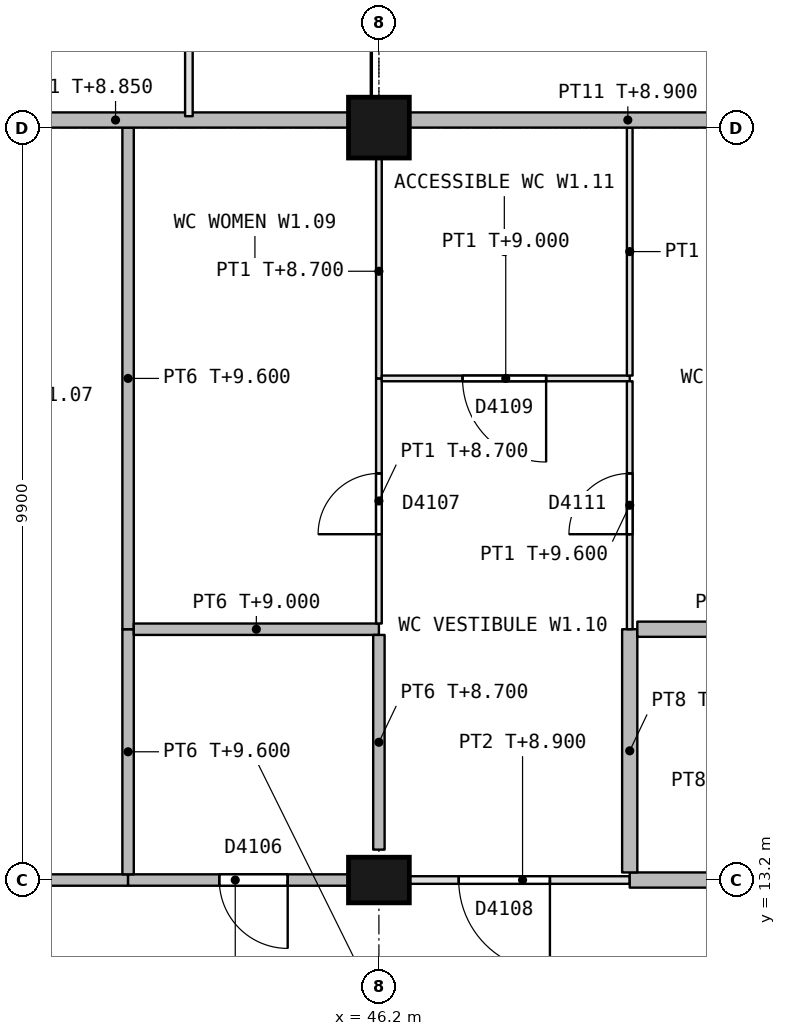
"""IFC4 building model, lengths in metres.
Left out: names, types, materials, properties, quantities, classifications, styles, units other than length and angle.
Written with IfcOpenShell. Run it as: python <this file> out.ifc"""

import sys

from ifc_helpers import new_model, si_unit, direction, frame, frame_2d, origin, origin_2d, place, context, subcontext, project, spatial, rectangle, extrude, element, fill, save


model = new_model("IFC4")
c1 = context("Model", 3, precision=1e-05, world=origin(), true_north=direction((0.0, 1.0)))
c2 = subcontext(c1, "Body", "Model", "MODEL_VIEW")
j1 = project(units=[si_unit("LENGTHUNIT", "METRE"), si_unit("PLANEANGLEUNIT", "RADIAN")], contexts=[c1])
p1 = place(None, origin())
s1 = spatial("IfcSite", under=j1, at=p1, CompositionType="ELEMENT")
p2 = place(p1, origin())
s2 = spatial("IfcBuilding", under=s1, at=p2, CompositionType="ELEMENT")
p3 = place(p2, frame((0.0, 0.0, 5.4)))
s3 = spatial("IfcBuildingStorey", under=s2, at=p3, CompositionType="ELEMENT", Elevation=5.4)
p4 = place(p3, frame((46.2, 13.2, 0.0), z_axis=(0.0, 0.0, 1.0), x_axis=(1.0, 0.0, 0.0)))
e1 = element("IfcColumn", 1, at=p4, inside=s3, PredefinedType="COLUMN", context=c2, shape_type="SweptSolid", body=[
    extrude(rectangle(XDim=0.8, YDim=0.6, at=origin_2d()), origin(), (0.0, 0.0, 1.0), 4.5),
])
p5 = place(p3, frame((46.2, 23.1, 0.0), z_axis=(0.0, 0.0, 1.0), x_axis=(1.0, 0.0, 0.0)))
e2 = element("IfcColumn", 2, at=p5, inside=s3, PredefinedType="COLUMN", context=c2, shape_type="SweptSolid", body=[
    extrude(rectangle(XDim=0.8, YDim=0.8, at=origin_2d()), origin(), (0.0, 0.0, 1.0), 4.5),
])
p6 = place(p3, frame((42.9, 13.2, 0.0), z_axis=(0.0, 0.0, 1.0), x_axis=(-1.0, 0.0, 0.0)))
e3 = element("IfcWall", 3, at=p6, inside=s3, PredefinedType="PARTITIONING", context=c2, shape_type="SweptSolid", body=[
    extrude(rectangle(XDim=3.3, YDim=0.15, at=frame_2d((1.65, 0.0))), origin(), (0.0, 0.0, 1.0), 3.5),
])
p7 = place(p6, frame((1.15, 0.0, 0.0)))
e4 = element("IfcOpeningElement", 4, at=p7, cuts=e3, PredefinedType="OPENING", context=c2, shape_type="SweptSolid", body=[
    extrude(rectangle(XDim=1.0, YDim=2.1, at=frame_2d((0.5, 1.05))), frame((0.0, 0.085, 0.0), z_axis=(0.0, -1.0, 0.0), x_axis=(1.0, 0.0, 0.0)), (0.0, 0.0, 1.0), 0.17),
])
p8 = place(p3, frame((45.8, 13.2, 0.0), z_axis=(0.0, 0.0, 1.0), x_axis=(-1.0, 0.0, 0.0)))
e5 = element("IfcWall", 5, at=p8, inside=s3, PredefinedType="PARTITIONING", context=c2, shape_type="SweptSolid", body=[
    extrude(rectangle(XDim=2.9, YDim=0.15, at=frame_2d((1.45, 0.0))), origin(), (0.0, 0.0, 1.0), 3.5),
])
p9 = place(p8, frame((0.8, 0.0, 0.0)))
e6 = element("IfcOpeningElement", 6, at=p9, cuts=e5, PredefinedType="OPENING", context=c2, shape_type="SweptSolid", body=[
    extrude(rectangle(XDim=0.9, YDim=2.1, at=frame_2d((0.45, 1.05))), frame((0.0, 0.085, 0.0), z_axis=(0.0, -1.0, 0.0), x_axis=(1.0, 0.0, 0.0)), (0.0, 0.0, 1.0), 0.17),
])
p10 = place(p3, frame((46.6, 13.2, 0.0), z_axis=(0.0, 0.0, 1.0), x_axis=(1.0, 0.0, 0.0)))
e7 = element("IfcWall", 7, at=p10, inside=s3, PredefinedType="PARTITIONING", context=c2, shape_type="SweptSolid", body=[
    extrude(rectangle(XDim=2.9, YDim=0.1, at=frame_2d((1.45, 0.0))), origin(), (0.0, 0.0, 1.0), 3.5),
])
p11 = place(p10, frame((0.65, 0.0, 0.0)))
e8 = element("IfcOpeningElement", 8, at=p11, cuts=e7, PredefinedType="OPENING", context=c2, shape_type="SweptSolid", body=[
    extrude(rectangle(XDim=1.2, YDim=2.1, at=frame_2d((0.6, 1.05))), frame((0.0, 0.06, 0.0), z_axis=(0.0, -1.0, 0.0), x_axis=(1.0, 0.0, 0.0)), (0.0, 0.0, 1.0), 0.12),
])
p12 = place(p3, frame((49.5, 13.2, 0.0), z_axis=(0.0, 0.0, 1.0), x_axis=(1.0, 0.0, 0.0)))
e9 = element("IfcWall", 9, at=p12, inside=s3, PredefinedType="PARTITIONING", context=c2, shape_type="SweptSolid", body=[
    extrude(rectangle(XDim=2.85, YDim=0.2, at=frame_2d((1.425, 0.0))), origin(), (0.0, 0.0, 1.0), 3.5),
])
p13 = place(p12, frame((1.35, 0.0, 0.0)))
e10 = element("IfcOpeningElement", 10, at=p13, cuts=e9, PredefinedType="OPENING", context=c2, shape_type="SweptSolid", body=[
    extrude(rectangle(XDim=0.6, YDim=2.1, at=frame_2d((0.3, 1.05))), frame((0.0, 0.11, 0.0), z_axis=(0.0, -1.0, 0.0), x_axis=(1.0, 0.0, 0.0)), (0.0, 0.0, 1.0), 0.22),
])
p14 = place(p3, frame((42.9, 13.275, 0.0), z_axis=(0.0, 0.0, 1.0), x_axis=(0.0, 1.0, 0.0)))
e11 = element("IfcWall", 11, at=p14, inside=s3, PredefinedType="PARTITIONING", context=c2, shape_type="SweptSolid", body=[
    extrude(rectangle(XDim=3.225, YDim=0.15, at=frame_2d((1.613, 0.0))), origin(), (0.0, 0.0, 1.0), 4.2),
])
p15 = place(p3, frame((42.9, 16.5, 0.0), z_axis=(0.0, 0.0, 1.0), x_axis=(0.0, 1.0, 0.0)))
e12 = element("IfcWall", 12, at=p15, inside=s3, PredefinedType="PARTITIONING", context=c2, shape_type="SweptSolid", body=[
    extrude(rectangle(XDim=6.6, YDim=0.15, at=frame_2d((3.3, 0.0))), origin(), (0.0, 0.0, 1.0), 4.2),
])
p16 = place(p3, frame((46.2, 16.5, 0.0), z_axis=(0.0, 0.0, 1.0), x_axis=(-1.0, 0.0, 0.0)))
e13 = element("IfcWall", 13, at=p16, inside=s3, PredefinedType="PARTITIONING", context=c2, shape_type="SweptSolid", body=[
    extrude(rectangle(XDim=3.225, YDim=0.15, at=frame_2d((1.612, 0.0))), origin(), (0.0, 0.0, 1.0), 3.6),
])
p17 = place(p3, frame((46.2, 13.6, 0.0), z_axis=(0.0, 0.0, 1.0), x_axis=(0.0, 1.0, 0.0)))
e14 = element("IfcWall", 14, at=p17, inside=s3, PredefinedType="PARTITIONING", context=c2, shape_type="SweptSolid", body=[
    extrude(rectangle(XDim=2.825, YDim=0.15, at=frame_2d((1.413, 0.0))), origin(), (0.0, 0.0, 1.0), 3.3),
])
p18 = place(p3, frame((46.2, 16.575, 0.0), z_axis=(0.0, 0.0, 1.0), x_axis=(0.0, 1.0, 0.0)))
e15 = element("IfcWall", 15, at=p18, inside=s3, PredefinedType="PARTITIONING", context=c2, shape_type="SweptSolid", body=[
    extrude(rectangle(XDim=3.225, YDim=0.075, at=frame_2d((1.613, 0.0))), origin(), (0.0, 0.0, 1.0), 3.3),
])
p19 = place(p18, frame((1.175, 0.0, 0.0)))
e16 = element("IfcOpeningElement", 16, at=p19, cuts=e15, PredefinedType="OPENING", context=c2, shape_type="SweptSolid", body=[
    extrude(rectangle(XDim=0.8, YDim=2.1, at=frame_2d((0.4, 1.05))), frame((0.0, 0.047, 0.0), z_axis=(0.0, -1.0, 0.0), x_axis=(1.0, 0.0, 0.0)), (0.0, 0.0, 1.0), 0.095),
])
p20 = place(p3, frame((46.2, 19.8, 0.0), z_axis=(0.0, 0.0, 1.0), x_axis=(0.0, 1.0, 0.0)))
e17 = element("IfcWall", 17, at=p20, inside=s3, PredefinedType="PARTITIONING", context=c2, shape_type="SweptSolid", body=[
    extrude(rectangle(XDim=2.9, YDim=0.075, at=frame_2d((1.45, 0.0))), origin(), (0.0, 0.0, 1.0), 3.3),
])
p21 = place(p3, frame((46.238, 19.8, 0.0), z_axis=(0.0, 0.0, 1.0), x_axis=(1.0, 0.0, 0.0)))
e18 = element("IfcWall", 18, at=p21, inside=s3, PredefinedType="PARTITIONING", context=c2, shape_type="SweptSolid", body=[
    extrude(rectangle(XDim=3.262, YDim=0.075, at=frame_2d((1.631, 0.0))), origin(), (0.0, 0.0, 1.0), 3.6),
])
p22 = place(p21, frame((1.062, 0.0, 0.0)))
e19 = element("IfcOpeningElement", 19, at=p22, cuts=e18, PredefinedType="OPENING", context=c2, shape_type="SweptSolid", body=[
    extrude(rectangle(XDim=1.1, YDim=2.1, at=frame_2d((0.55, 1.05))), frame((0.0, 0.047, 0.0), z_axis=(0.0, -1.0, 0.0), x_axis=(1.0, 0.0, 0.0)), (0.0, 0.0, 1.0), 0.095),
])
p23 = place(p3, frame((49.5, 13.3, 0.0), z_axis=(0.0, 0.0, 1.0), x_axis=(0.0, 1.0, 0.0)))
e20 = element("IfcWall", 20, at=p23, inside=s3, PredefinedType="PARTITIONING", context=c2, shape_type="SweptSolid", body=[
    extrude(rectangle(XDim=3.2, YDim=0.2, at=frame_2d((1.6, 0.0))), origin(), (0.0, 0.0, 1.0), 4.2),
])
p24 = place(p3, frame((49.5, 19.762, 0.0), z_axis=(0.0, 0.0, 1.0), x_axis=(0.0, -1.0, 0.0)))
e21 = element("IfcWall", 21, at=p24, inside=s3, PredefinedType="PARTITIONING", context=c2, shape_type="SweptSolid", body=[
    extrude(rectangle(XDim=3.262, YDim=0.075, at=frame_2d((1.631, 0.0))), origin(), (0.0, 0.0, 1.0), 4.2),
])
p25 = place(p24, frame((1.212, 0.0, 0.0)))
e22 = element("IfcOpeningElement", 22, at=p25, cuts=e21, PredefinedType="OPENING", context=c2, shape_type="SweptSolid", body=[
    extrude(rectangle(XDim=0.8, YDim=2.1, at=frame_2d((0.4, 1.05))), frame((0.0, 0.047, 0.0), z_axis=(0.0, -1.0, 0.0), x_axis=(1.0, 0.0, 0.0)), (0.0, 0.0, 1.0), 0.095),
])
p26 = place(p3, frame((49.5, 19.837, 0.0), z_axis=(0.0, 0.0, 1.0), x_axis=(0.0, 1.0, 0.0)))
e23 = element("IfcWall", 23, at=p26, inside=s3, PredefinedType="PARTITIONING", context=c2, shape_type="SweptSolid", body=[
    extrude(rectangle(XDim=3.263, YDim=0.075, at=frame_2d((1.631, 0.0))), origin(), (0.0, 0.0, 1.0), 4.2),
])
p27 = place(p3, frame((52.8, 16.5, 0.0), z_axis=(0.0, 0.0, 1.0), x_axis=(-1.0, 0.0, 0.0)))
e24 = element("IfcWall", 24, at=p27, inside=s3, PredefinedType="PARTITIONING", context=c2, shape_type="SweptSolid", body=[
    extrude(rectangle(XDim=3.2, YDim=0.2, at=frame_2d((1.6, 0.0))), origin(), (0.0, 0.0, 1.0), 3.6),
])
p28 = place(p3, frame((39.75, 23.2, 0.0), z_axis=(0.0, 0.0, 1.0), x_axis=(1.0, 0.0, 0.0)))
e25 = element("IfcWall", 25, at=p28, inside=s3, PredefinedType="PARTITIONING", context=c2, shape_type="SweptSolid", body=[
    extrude(rectangle(XDim=6.05, YDim=0.2, at=frame_2d((3.025, 0.0))), origin(), (0.0, 0.0, 1.0), 3.45),
])
p29 = place(p3, frame((46.6, 23.2, 0.0), z_axis=(0.0, 0.0, 1.0), x_axis=(1.0, 0.0, 0.0)))
e26 = element("IfcWall", 26, at=p29, inside=s3, PredefinedType="PARTITIONING", context=c2, shape_type="SweptSolid", body=[
    extrude(rectangle(XDim=5.75, YDim=0.2, at=frame_2d((2.875, 0.0))), origin(), (0.0, 0.0, 1.0), 3.5),
])
p30 = place(p3, frame((43.7, 23.25, 0.0), z_axis=(0.0, 0.0, 1.0), x_axis=(0.0, 1.0, 0.0)))
e27 = element("IfcWall", 27, at=p30, inside=s3, PredefinedType="PARTITIONING", context=c2, shape_type="SweptSolid", body=[
    extrude(rectangle(XDim=13.05, YDim=0.1, at=frame_2d((6.525, 0.0))), origin(), (0.0, 0.0, 1.0), 3.5),
])
p31 = place(p30, frame((2.65, 0.0, 0.0)))
e28 = element("IfcOpeningElement", 28, at=p31, cuts=e27, PredefinedType="OPENING", context=c2, shape_type="SweptSolid", body=[
    extrude(rectangle(XDim=1.0, YDim=2.1, at=frame_2d((0.5, 1.05))), frame((0.0, 0.06, 0.0), z_axis=(0.0, -1.0, 0.0), x_axis=(1.0, 0.0, 0.0)), (0.0, 0.0, 1.0), 0.12),
])
p32 = place(p30, frame((9.25, 0.0, 0.0)))
e29 = element("IfcOpeningElement", 29, at=p32, cuts=e27, PredefinedType="OPENING", context=c2, shape_type="SweptSolid", body=[
    extrude(rectangle(XDim=1.0, YDim=2.1, at=frame_2d((0.5, 1.05))), frame((0.0, 0.06, 0.0), z_axis=(0.0, -1.0, 0.0), x_axis=(1.0, 0.0, 0.0)), (0.0, 0.0, 1.0), 0.12),
])
p33 = place(p9, origin())
e30 = element("IfcDoor", 30, at=p33, inside=s3, OperationType="SINGLE_SWING_LEFT", PredefinedType="DOOR", context=c2, shape_type="SweptSolid", body=[
    extrude(rectangle(XDim=0.9, YDim=2.1, at=frame_2d((0.45, 1.05))), frame((0.0, 0.027, 0.0), z_axis=(0.0, -1.0, 0.0), x_axis=(1.0, 0.0, 0.0)), (0.0, 0.0, 1.0), 0.054),
])
fill(e6, e30)
p34 = place(p19, origin())
e31 = element("IfcDoor", 31, at=p34, inside=s3, OperationType="SINGLE_SWING_LEFT", PredefinedType="DOOR", context=c2, shape_type="SweptSolid", body=[
    extrude(rectangle(XDim=0.8, YDim=2.1, at=frame_2d((0.4, 1.05))), frame((0.0, 0.022, 0.0), z_axis=(0.0, -1.0, 0.0), x_axis=(1.0, 0.0, 0.0)), (0.0, 0.0, 1.0), 0.044),
])
fill(e16, e31)
p35 = place(p11, origin())
e32 = element("IfcDoor", 32, at=p35, inside=s3, OperationType="SINGLE_SWING_RIGHT", PredefinedType="DOOR", context=c2, shape_type="SweptSolid", body=[
    extrude(rectangle(XDim=1.2, YDim=2.1, at=frame_2d((0.6, 1.05))), frame((0.0, 0.022, 0.0), z_axis=(0.0, -1.0, 0.0), x_axis=(1.0, 0.0, 0.0)), (0.0, 0.0, 1.0), 0.044),
])
fill(e8, e32)
p36 = place(p22, origin())
e33 = element("IfcDoor", 33, at=p36, inside=s3, OperationType="SINGLE_SWING_RIGHT", PredefinedType="DOOR", context=c2, shape_type="SweptSolid", body=[
    extrude(rectangle(XDim=1.1, YDim=2.1, at=frame_2d((0.55, 1.05))), frame((0.0, 0.022, 0.0), z_axis=(0.0, -1.0, 0.0), x_axis=(1.0, 0.0, 0.0)), (0.0, 0.0, 1.0), 0.044),
])
fill(e19, e33)
p37 = place(p25, origin())
e34 = element("IfcDoor", 34, at=p37, inside=s3, OperationType="SINGLE_SWING_RIGHT", PredefinedType="DOOR", context=c2, shape_type="SweptSolid", body=[
    extrude(rectangle(XDim=0.8, YDim=2.1, at=frame_2d((0.4, 1.05))), frame((0.0, 0.022, 0.0), z_axis=(0.0, -1.0, 0.0), x_axis=(1.0, 0.0, 0.0)), (0.0, 0.0, 1.0), 0.044),
])
fill(e22, e34)
save(model, sys.argv[1])
